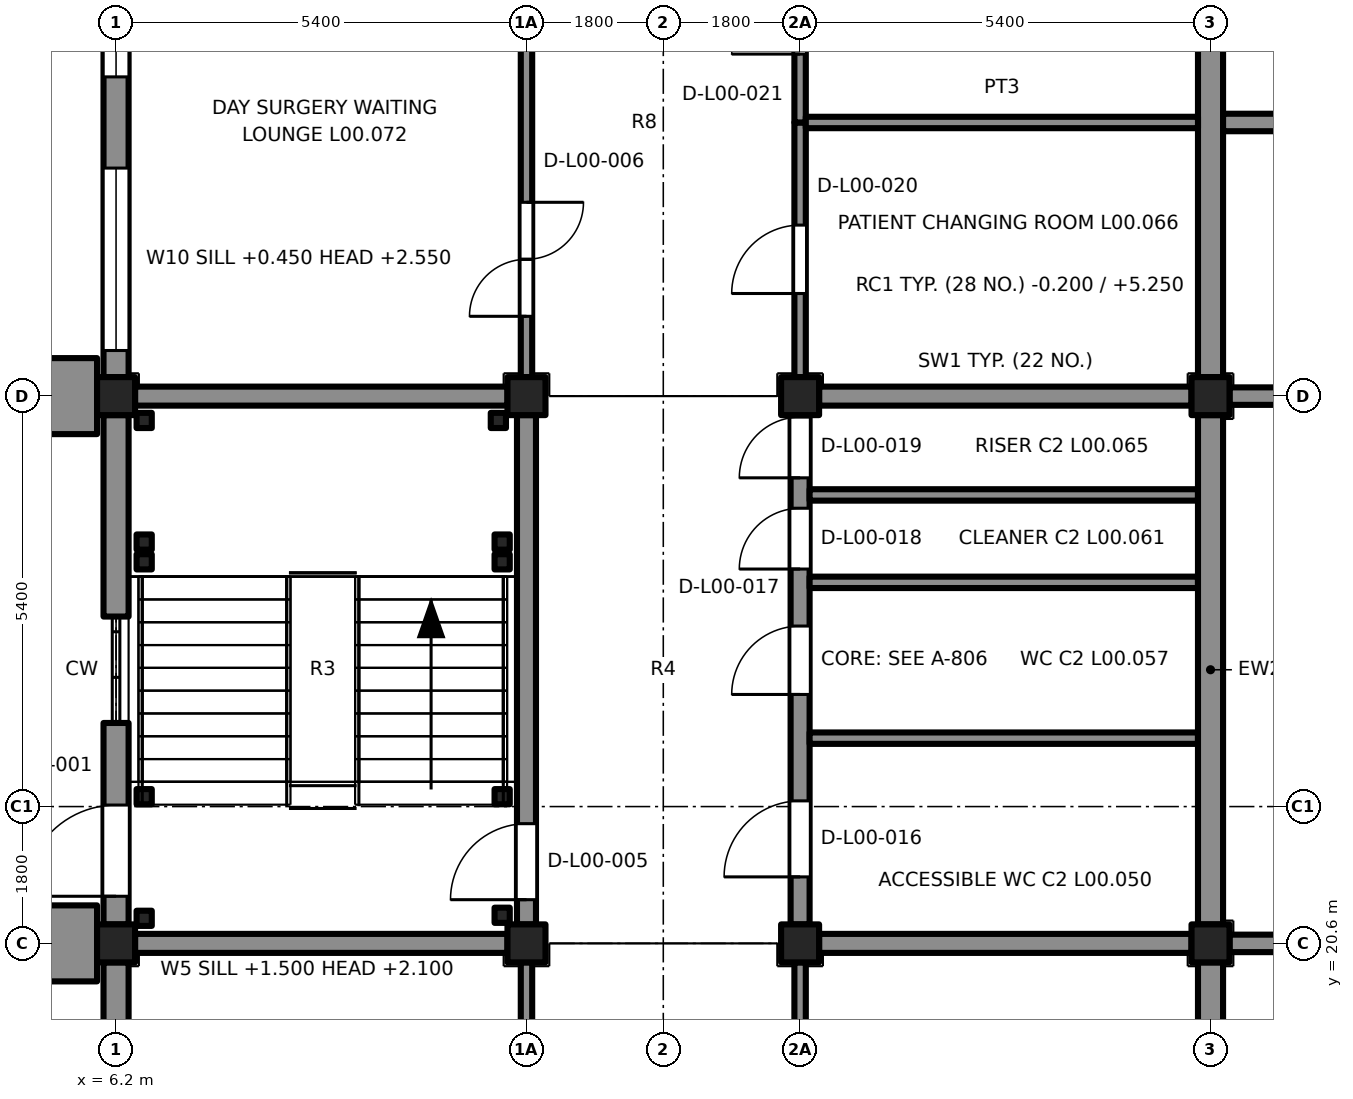
"""IFC4 building model, lengths in metres.
Left out: names, types, materials, properties, quantities, classifications, styles, units other than length and angle.
Written with IfcOpenShell. Run it as: python <this file> out.ifc"""

import sys

from ifc_helpers import new_model, si_unit, direction, frame, frame_2d, origin, origin_2d, place, context, subcontext, project, spatial, rectangle, extrude, element, fill, save


model = new_model("IFC4")
c1 = context("Model", 3, precision=1e-05, world=origin(), true_north=direction((0.0, 1.0)))
c2 = subcontext(c1, "Body", "Model", "MODEL_VIEW")
j1 = project(units=[si_unit("LENGTHUNIT", "METRE"), si_unit("PLANEANGLEUNIT", "RADIAN")], contexts=[c1])
p1 = place(None, origin())
s1 = spatial("IfcSite", under=j1, at=p1, CompositionType="ELEMENT")
p2 = place(p1, origin())
s2 = spatial("IfcBuilding", under=s1, at=p2, CompositionType="ELEMENT")
p3 = place(p2, origin())
s3 = spatial("IfcBuildingStorey", under=s2, at=p3, CompositionType="ELEMENT", Elevation=0.0)
for number, where, z_axis, x_axis in (
    (1, (6.2, 20.6, -0.2), (0.0, 0.0, 1.0), (1.0, 0.0, 0.0)),
    (2, (6.2, 27.8, -0.2), (0.0, 0.0, 1.0), (1.0, 0.0, 0.0)),
    (3, (11.6, 20.6, -0.2), (0.0, 0.0, 1.0), (1.0, 0.0, 0.0)),
    (4, (11.6, 27.8, -0.2), (0.0, 0.0, 1.0), (1.0, 0.0, 0.0)),
    (5, (15.2, 20.6, -0.2), (0.0, 0.0, 1.0), (1.0, 0.0, 0.0)),
    (6, (15.2, 27.8, -0.2), (0.0, 0.0, 1.0), (1.0, 0.0, 0.0)),
    (7, (20.6, 20.6, -0.2), (0.0, 0.0, 1.0), (1.0, 0.0, 0.0)),
    (8, (20.6, 27.8, -0.2), (0.0, 0.0, 1.0), (1.0, 0.0, 0.0)),
):
    element("IfcColumn", number, at=place(p3, frame(where, z_axis=z_axis, x_axis=x_axis)), inside=s3, PredefinedType="COLUMN", context=c2, shape_type="SweptSolid", body=[
        extrude(rectangle(XDim=0.5, YDim=0.5, at=origin_2d()), origin(), (0.0, 0.0, 1.0), 5.45),
    ])
p4 = place(p3, frame((11.6, 20.85, 0.0), z_axis=(0.0, 0.0, 1.0), x_axis=(0.0, 1.0, 0.0)))
e9 = element("IfcWall", 9, at=p4, inside=s3, PredefinedType="SHEAR", context=c2, shape_type="SweptSolid", body=[
    extrude(rectangle(XDim=6.7, YDim=0.25, at=frame_2d((3.35, 0.0))), origin(), (0.0, 0.0, 1.0), 6.05),
])
p5 = place(p4, frame((0.325, 0.0, 0.0)))
e10 = element("IfcOpeningElement", 10, at=p5, cuts=e9, PredefinedType="OPENING", context=c2, shape_type="SweptSolid", body=[
    extrude(rectangle(XDim=1.0, YDim=2.1, at=frame_2d((0.5, 1.05))), frame((0.0, 0.135, 0.0), z_axis=(0.0, -1.0, 0.0), x_axis=(1.0, 0.0, 0.0)), (0.0, 0.0, 1.0), 0.27),
])
for number, where, z_axis, x_axis in (
    (11, (6.45, 20.6, 0.0), (0.0, 0.0, 1.0), (1.0, 0.0, 0.0)),
    (12, (6.45, 27.8, 0.0), (0.0, 0.0, 1.0), (1.0, 0.0, 0.0)),
):
    element("IfcWall", number, at=place(p3, frame(where, z_axis=z_axis, x_axis=x_axis)), inside=s3, PredefinedType="SHEAR", context=c2, shape_type="SweptSolid", body=[
        extrude(rectangle(XDim=4.9, YDim=0.25, at=frame_2d((2.45, 0.0))), origin(), (0.0, 0.0, 1.0), 6.05),
    ])
p6 = place(p3, frame((15.2, 20.85, 0.0), z_axis=(0.0, 0.0, 1.0), x_axis=(0.0, 1.0, 0.0)))
e13 = element("IfcWall", 13, at=p6, inside=s3, PredefinedType="SHEAR", context=c2, shape_type="SweptSolid", body=[
    extrude(rectangle(XDim=6.7, YDim=0.25, at=frame_2d((3.35, 0.0))), origin(), (0.0, 0.0, 1.0), 6.05),
])
p7 = place(p6, frame((0.625, 0.0, 0.0)))
e14 = element("IfcOpeningElement", 14, at=p7, cuts=e13, PredefinedType="OPENING", context=c2, shape_type="SweptSolid", body=[
    extrude(rectangle(XDim=1.0, YDim=2.1, at=frame_2d((0.5, 1.05))), frame((0.0, 0.135, 0.0), z_axis=(0.0, -1.0, 0.0), x_axis=(1.0, 0.0, 0.0)), (0.0, 0.0, 1.0), 0.27),
])
p8 = place(p6, frame((3.025, 0.0, 0.0)))
e15 = element("IfcOpeningElement", 15, at=p8, cuts=e13, PredefinedType="OPENING", context=c2, shape_type="SweptSolid", body=[
    extrude(rectangle(XDim=0.9, YDim=2.1, at=frame_2d((0.45, 1.05))), frame((0.0, 0.135, 0.0), z_axis=(0.0, -1.0, 0.0), x_axis=(1.0, 0.0, 0.0)), (0.0, 0.0, 1.0), 0.27),
])
p9 = place(p6, frame((4.675, 0.0, 0.0)))
e16 = element("IfcOpeningElement", 16, at=p9, cuts=e13, PredefinedType="OPENING", context=c2, shape_type="SweptSolid", body=[
    extrude(rectangle(XDim=0.8, YDim=2.1, at=frame_2d((0.4, 1.05))), frame((0.0, 0.135, 0.0), z_axis=(0.0, -1.0, 0.0), x_axis=(1.0, 0.0, 0.0)), (0.0, 0.0, 1.0), 0.27),
])
p10 = place(p6, frame((5.875, 0.0, 0.0)))
e17 = element("IfcOpeningElement", 17, at=p10, cuts=e13, PredefinedType="OPENING", context=c2, shape_type="SweptSolid", body=[
    extrude(rectangle(XDim=0.8, YDim=2.1, at=frame_2d((0.4, 1.05))), frame((0.0, 0.135, 0.0), z_axis=(0.0, -1.0, 0.0), x_axis=(1.0, 0.0, 0.0)), (0.0, 0.0, 1.0), 0.27),
])
for number, where, z_axis, x_axis in (
    (18, (15.45, 20.6, 0.0), (0.0, 0.0, 1.0), (1.0, 0.0, 0.0)),
    (19, (15.45, 27.8, 0.0), (0.0, 0.0, 1.0), (1.0, 0.0, 0.0)),
):
    element("IfcWall", number, at=place(p3, frame(where, z_axis=z_axis, x_axis=x_axis)), inside=s3, PredefinedType="SHEAR", context=c2, shape_type="SweptSolid", body=[
        extrude(rectangle(XDim=4.9, YDim=0.25, at=frame_2d((2.45, 0.0))), origin(), (0.0, 0.0, 1.0), 6.05),
    ])
for number, where, z_axis, x_axis in (
    (20, (15.325, 23.3, 0.0), (0.0, 0.0, 1.0), (1.0, 0.0, 0.0)),
    (21, (15.325, 25.35, 0.0), (0.0, 0.0, 1.0), (1.0, 0.0, 0.0)),
    (22, (15.325, 26.5, 0.0), (0.0, 0.0, 1.0), (1.0, 0.0, 0.0)),
):
    element("IfcWall", number, at=place(p3, frame(where, z_axis=z_axis, x_axis=x_axis)), inside=s3, PredefinedType="PARTITIONING", context=c2, shape_type="SweptSolid", body=[
        extrude(rectangle(XDim=5.11, YDim=0.15, at=frame_2d((2.555, 0.0))), origin(), (0.0, 0.0, 1.0), 6.05),
    ])
p11 = place(p3, frame((6.57, 25.62, 0.0), z_axis=(0.0, 0.0, 1.0), x_axis=(1.0, 0.0, 0.0)))
e23 = element("IfcColumn", 23, at=p11, inside=s3, PredefinedType="COLUMN", context=c2, shape_type="SweptSolid", body=[
    extrude(rectangle(XDim=0.2, YDim=0.2, at=origin_2d()), origin(), (0.0, 0.0, 1.0), 4.45),
])
p12 = place(p3, frame((6.57, 27.48, 0.0), z_axis=(0.0, 0.0, 1.0), x_axis=(1.0, 0.0, 0.0)))
e24 = element("IfcColumn", 24, at=p12, inside=s3, PredefinedType="COLUMN", context=c2, shape_type="SweptSolid", body=[
    extrude(rectangle(XDim=0.2, YDim=0.2, at=origin_2d()), origin(), (0.0, 0.0, 1.0), 6.3),
])
p13 = place(p3, frame((11.28, 25.62, 0.0), z_axis=(0.0, 0.0, 1.0), x_axis=(1.0, 0.0, 0.0)))
e25 = element("IfcColumn", 25, at=p13, inside=s3, PredefinedType="COLUMN", context=c2, shape_type="SweptSolid", body=[
    extrude(rectangle(XDim=0.2, YDim=0.2, at=origin_2d()), origin(), (0.0, 0.0, 1.0), 4.45),
])
p14 = place(p3, frame((11.23, 27.48, 0.0), z_axis=(0.0, 0.0, 1.0), x_axis=(1.0, 0.0, 0.0)))
e26 = element("IfcColumn", 26, at=p14, inside=s3, PredefinedType="COLUMN", context=c2, shape_type="SweptSolid", body=[
    extrude(rectangle(XDim=0.2, YDim=0.2, at=origin_2d()), origin(), (0.0, 0.0, 1.0), 6.3),
])
for number, where, z_axis, x_axis in (
    (27, (6.57, 20.93, 0.0), (0.0, 0.0, 1.0), (1.0, 0.0, 0.0)),
    (28, (6.57, 22.53, 0.0), (0.0, 0.0, 1.0), (1.0, 0.0, 0.0)),
    (29, (11.28, 20.97, 0.0), (0.0, 0.0, 1.0), (1.0, 0.0, 0.0)),
    (30, (11.28, 22.53, 0.0), (0.0, 0.0, 1.0), (1.0, 0.0, 0.0)),
):
    element("IfcColumn", number, at=place(p3, frame(where, z_axis=z_axis, x_axis=x_axis)), inside=s3, PredefinedType="COLUMN", context=c2, shape_type="SweptSolid", body=[
        extrude(rectangle(XDim=0.2, YDim=0.2, at=origin_2d()), origin(), (0.0, 0.0, 1.0), 2.95),
    ])
for number, where, z_axis, x_axis in (
    (31, (6.57, 25.88, 0.0), (0.0, 0.0, 1.0), (1.0, 0.0, 0.0)),
    (32, (11.28, 25.88, 0.0), (0.0, 0.0, 1.0), (1.0, 0.0, 0.0)),
):
    element("IfcColumn", number, at=place(p3, frame(where, z_axis=z_axis, x_axis=x_axis)), inside=s3, PredefinedType="COLUMN", context=c2, shape_type="SweptSolid", body=[
        extrude(rectangle(XDim=0.2, YDim=0.2, at=origin_2d()), origin(), (0.0, 0.0, 1.0), 6.3),
    ])
p15 = place(p3, frame((6.2, 13.65, 0.0), z_axis=(0.0, 0.0, 1.0), x_axis=(0.0, 1.0, 0.0)))
e33 = element("IfcWall", 33, at=p15, inside=s3, PredefinedType="SOLIDWALL", context=c2, shape_type="SweptSolid", body=[
    extrude(rectangle(XDim=6.7, YDim=0.33, at=frame_2d((3.35, 0.0))), origin(), (0.0, 0.0, 1.0), 5.25),
])
p16 = place(p15, frame((0.95, 0.0, 0.9)))
e34 = element("IfcOpeningElement", 34, at=p16, cuts=e33, PredefinedType="OPENING", context=c2, shape_type="SweptSolid", body=[
    extrude(rectangle(XDim=1.2, YDim=1.5, at=frame_2d((0.6, 0.75))), frame((0.0, 0.175, 0.0), z_axis=(0.0, -1.0, 0.0), x_axis=(1.0, 0.0, 0.0)), (0.0, 0.0, 1.0), 0.35),
])
p17 = place(p15, frame((4.85, 0.0, 1.5)))
e35 = element("IfcOpeningElement", 35, at=p17, cuts=e33, PredefinedType="OPENING", context=c2, shape_type="SweptSolid", body=[
    extrude(rectangle(XDim=0.6, YDim=0.6, at=frame_2d((0.3, 0.3))), frame((0.0, 0.175, 0.0), z_axis=(0.0, -1.0, 0.0), x_axis=(1.0, 0.0, 0.0)), (0.0, 0.0, 1.0), 0.35),
])
p18 = place(p3, frame((6.2, 20.85, 0.0), z_axis=(0.0, 0.0, 1.0), x_axis=(0.0, 1.0, 0.0)))
e36 = element("IfcWall", 36, at=p18, inside=s3, PredefinedType="SOLIDWALL", context=c2, shape_type="SweptSolid", body=[
    extrude(rectangle(XDim=2.65, YDim=0.33, at=frame_2d((1.325, 0.0))), origin(), (0.0, 0.0, 1.0), 5.25),
])
p19 = place(p18, frame((0.37, 0.0, 0.0)))
e37 = element("IfcOpeningElement", 37, at=p19, cuts=e36, PredefinedType="OPENING", context=c2, shape_type="SweptSolid", body=[
    extrude(rectangle(XDim=1.2, YDim=2.1, at=frame_2d((0.6, 1.05))), frame((0.0, 0.175, 0.0), z_axis=(0.0, -1.0, 0.0), x_axis=(1.0, 0.0, 0.0)), (0.0, 0.0, 1.0), 0.35),
])
p20 = place(p3, frame((6.2, 24.9, 0.0), z_axis=(0.0, 0.0, 1.0), x_axis=(0.0, 1.0, 0.0)))
e38 = element("IfcWall", 38, at=p20, inside=s3, PredefinedType="SOLIDWALL", context=c2, shape_type="SweptSolid", body=[
    extrude(rectangle(XDim=2.65, YDim=0.33, at=frame_2d((1.325, 0.0))), origin(), (0.0, 0.0, 1.0), 5.25),
])
p21 = place(p3, frame((6.2, 28.05, 0.0), z_axis=(0.0, 0.0, 1.0), x_axis=(0.0, 1.0, 0.0)))
e39 = element("IfcWall", 39, at=p21, inside=s3, PredefinedType="SOLIDWALL", context=c2, shape_type="SweptSolid", body=[
    extrude(rectangle(XDim=6.7, YDim=0.33, at=frame_2d((3.35, 0.0))), origin(), (0.0, 0.0, 1.0), 5.25),
])
p22 = place(p21, frame((0.35, 0.0, 0.45)))
e40 = element("IfcOpeningElement", 40, at=p22, cuts=e39, PredefinedType="OPENING", context=c2, shape_type="SweptSolid", body=[
    extrude(rectangle(XDim=2.4, YDim=2.1, at=frame_2d((1.2, 1.05))), frame((0.0, 0.175, 0.0), z_axis=(0.0, -1.0, 0.0), x_axis=(1.0, 0.0, 0.0)), (0.0, 0.0, 1.0), 0.35),
])
p23 = place(p21, frame((3.95, 0.0, 0.45)))
e41 = element("IfcOpeningElement", 41, at=p23, cuts=e39, PredefinedType="OPENING", context=c2, shape_type="SweptSolid", body=[
    extrude(rectangle(XDim=2.4, YDim=2.1, at=frame_2d((1.2, 1.05))), frame((0.0, 0.175, 0.0), z_axis=(0.0, -1.0, 0.0), x_axis=(1.0, 0.0, 0.0)), (0.0, 0.0, 1.0), 0.35),
])
for number, where, z_axis, x_axis in (
    (42, (5.575, 20.1, 0.0), (0.0, 0.0, 1.0), (0.0, 1.0, 0.0)),
    (43, (5.575, 27.3, 0.0), (0.0, 0.0, 1.0), (0.0, 1.0, 0.0)),
):
    element("IfcWall", number, at=place(p3, frame(where, z_axis=z_axis, x_axis=x_axis)), inside=s3, PredefinedType="SOLIDWALL", context=c2, shape_type="SweptSolid", body=[
        extrude(rectangle(XDim=1.0, YDim=0.75, at=frame_2d((0.5, 0.0))), origin(), (0.0, 0.0, 1.0), 6.3),
    ])
p24 = place(p3, frame((20.6, 20.35, 0.0), z_axis=(0.0, 0.0, 1.0), x_axis=(0.0, -1.0, 0.0)))
e44 = element("IfcWall", 44, at=p24, inside=s3, PredefinedType="SOLIDWALL", context=c2, shape_type="SweptSolid", body=[
    extrude(rectangle(XDim=6.7, YDim=0.33, at=frame_2d((3.35, 0.0))), origin(), (0.0, 0.0, 1.0), 5.25),
])
for number, where, z_axis, x_axis in (
    (45, (20.6, 27.55, 0.0), (0.0, 0.0, 1.0), (0.0, -1.0, 0.0)),
    (46, (20.6, 34.75, 0.0), (0.0, 0.0, 1.0), (0.0, -1.0, 0.0)),
):
    element("IfcWall", number, at=place(p3, frame(where, z_axis=z_axis, x_axis=x_axis)), inside=s3, PredefinedType="SOLIDWALL", context=c2, shape_type="SweptSolid", body=[
        extrude(rectangle(XDim=6.7, YDim=0.33, at=frame_2d((3.35, 0.0))), origin(), (0.0, 0.0, 1.0), 5.25),
    ])
p25 = place(p3, frame((11.6, 20.35, 0.0), z_axis=(0.0, 0.0, 1.0), x_axis=(0.0, -1.0, 0.0)))
e47 = element("IfcWall", 47, at=p25, inside=s3, PredefinedType="PARTITIONING", context=c2, shape_type="SweptSolid", body=[
    extrude(rectangle(XDim=3.35, YDim=0.15, at=frame_2d((1.675, 0.0))), origin(), (0.0, 0.0, 1.0), 5.25),
])
p26 = place(p25, frame((1.1, 0.0, 0.0)))
e48 = element("IfcOpeningElement", 48, at=p26, cuts=e47, PredefinedType="OPENING", context=c2, shape_type="SweptSolid", body=[
    extrude(rectangle(XDim=0.9, YDim=2.1, at=frame_2d((0.45, 1.05))), frame((0.0, 0.085, 0.0), z_axis=(0.0, -1.0, 0.0), x_axis=(1.0, 0.0, 0.0)), (0.0, 0.0, 1.0), 0.17),
])
p27 = place(p3, frame((11.6, 28.05, 0.0), z_axis=(0.0, 0.0, 1.0), x_axis=(0.0, 1.0, 0.0)))
e49 = element("IfcWall", 49, at=p27, inside=s3, PredefinedType="PARTITIONING", context=c2, shape_type="SweptSolid", body=[
    extrude(rectangle(XDim=6.7, YDim=0.15, at=frame_2d((3.35, 0.0))), origin(), (0.0, 0.0, 1.0), 5.25),
])
p28 = place(p27, frame((0.8, 0.0, 0.0)))
e50 = element("IfcOpeningElement", 50, at=p28, cuts=e49, PredefinedType="OPENING", context=c2, shape_type="SweptSolid", body=[
    extrude(rectangle(XDim=1.5, YDim=2.1, at=frame_2d((0.75, 1.05))), frame((0.0, 0.085, 0.0), z_axis=(0.0, -1.0, 0.0), x_axis=(1.0, 0.0, 0.0)), (0.0, 0.0, 1.0), 0.17),
])
p29 = place(p3, frame((15.2, 20.35, 0.0), z_axis=(0.0, 0.0, 1.0), x_axis=(0.0, -1.0, 0.0)))
e51 = element("IfcWall", 51, at=p29, inside=s3, PredefinedType="PARTITIONING", context=c2, shape_type="SweptSolid", body=[
    extrude(rectangle(XDim=3.35, YDim=0.15, at=frame_2d((1.675, 0.0))), origin(), (0.0, 0.0, 1.0), 5.25),
])
p30 = place(p29, frame((1.05, 0.0, 0.0)))
e52 = element("IfcOpeningElement", 52, at=p30, cuts=e51, PredefinedType="OPENING", context=c2, shape_type="SweptSolid", body=[
    extrude(rectangle(XDim=1.0, YDim=2.1, at=frame_2d((0.5, 1.05))), frame((0.0, 0.085, 0.0), z_axis=(0.0, -1.0, 0.0), x_axis=(1.0, 0.0, 0.0)), (0.0, 0.0, 1.0), 0.17),
])
p31 = place(p3, frame((15.2, 28.05, 0.0), z_axis=(0.0, 0.0, 1.0), x_axis=(0.0, 1.0, 0.0)))
e53 = element("IfcWall", 53, at=p31, inside=s3, PredefinedType="PARTITIONING", context=c2, shape_type="SweptSolid", body=[
    extrude(rectangle(XDim=3.35, YDim=0.15, at=frame_2d((1.675, 0.0))), origin(), (0.0, 0.0, 1.0), 5.25),
])
p32 = place(p31, frame((1.1, 0.0, 0.0)))
e54 = element("IfcOpeningElement", 54, at=p32, cuts=e53, PredefinedType="OPENING", context=c2, shape_type="SweptSolid", body=[
    extrude(rectangle(XDim=0.9, YDim=2.1, at=frame_2d((0.45, 1.05))), frame((0.0, 0.085, 0.0), z_axis=(0.0, -1.0, 0.0), x_axis=(1.0, 0.0, 0.0)), (0.0, 0.0, 1.0), 0.17),
])
p33 = place(p3, frame((15.2, 34.75, 0.0), z_axis=(0.0, 0.0, 1.0), x_axis=(0.0, -1.0, 0.0)))
e55 = element("IfcWall", 55, at=p33, inside=s3, PredefinedType="PARTITIONING", context=c2, shape_type="SweptSolid", body=[
    extrude(rectangle(XDim=3.35, YDim=0.15, at=frame_2d((1.675, 0.0))), origin(), (0.0, 0.0, 1.0), 5.25),
])
p34 = place(p33, frame((0.65, 0.0, 0.0)))
e56 = element("IfcOpeningElement", 56, at=p34, cuts=e55, PredefinedType="OPENING", context=c2, shape_type="SweptSolid", body=[
    extrude(rectangle(XDim=1.8, YDim=2.1, at=frame_2d((0.9, 1.05))), frame((0.0, 0.085, 0.0), z_axis=(0.0, -1.0, 0.0), x_axis=(1.0, 0.0, 0.0)), (0.0, 0.0, 1.0), 0.17),
])
p35 = place(p3, frame((20.435, 31.4, 0.0), z_axis=(0.0, 0.0, 1.0), x_axis=(-1.0, 0.0, 0.0)))
e57 = element("IfcWall", 57, at=p35, inside=s3, PredefinedType="PARTITIONING", context=c2, shape_type="SweptSolid", body=[
    extrude(rectangle(XDim=5.16, YDim=0.15, at=frame_2d((2.58, 0.0))), origin(), (0.0, 0.0, 1.0), 6.05),
])
for number, where, z_axis, x_axis in (
    (58, (20.85, 20.6, 0.0), (0.0, 0.0, 1.0), (1.0, 0.0, 0.0)),
    (59, (20.85, 27.8, 0.0), (0.0, 0.0, 1.0), (1.0, 0.0, 0.0)),
):
    element("IfcWall", number, at=place(p3, frame(where, z_axis=z_axis, x_axis=x_axis)), inside=s3, PredefinedType="SOLIDWALL", context=c2, shape_type="SweptSolid", body=[
        extrude(rectangle(XDim=4.9, YDim=0.23, at=frame_2d((2.45, 0.0))), origin(), (0.0, 0.0, 1.0), 6.05),
    ])
p36 = place(p3, frame((20.765, 31.4, 0.0), z_axis=(0.0, 0.0, 1.0), x_axis=(1.0, 0.0, 0.0)))
e60 = element("IfcWall", 60, at=p36, inside=s3, PredefinedType="SOLIDWALL", context=c2, shape_type="SweptSolid", body=[
    extrude(rectangle(XDim=5.06, YDim=0.23, at=frame_2d((2.53, 0.0))), origin(), (0.0, 0.0, 1.0), 6.05),
])
p37 = place(p5, origin())
e61 = element("IfcDoor", 61, at=p37, inside=s3, OperationType="SINGLE_SWING_RIGHT", PredefinedType="DOOR", context=c2, shape_type="SweptSolid", body=[
    extrude(rectangle(XDim=1.0, YDim=2.1, at=frame_2d((0.5, 1.05))), frame((0.0, 0.025, 0.0), z_axis=(0.0, -1.0, 0.0), x_axis=(1.0, 0.0, 0.0)), (0.0, 0.0, 1.0), 0.05),
])
fill(e10, e61)
p38 = place(p7, origin())
e62 = element("IfcDoor", 62, at=p38, inside=s3, OperationType="SINGLE_SWING_LEFT", PredefinedType="DOOR", context=c2, shape_type="SweptSolid", body=[
    extrude(rectangle(XDim=1.0, YDim=2.1, at=frame_2d((0.5, 1.05))), frame((0.0, 0.025, 0.0), z_axis=(0.0, -1.0, 0.0), x_axis=(1.0, 0.0, 0.0)), (0.0, 0.0, 1.0), 0.05),
])
fill(e14, e62)
p39 = place(p8, origin())
e63 = element("IfcDoor", 63, at=p39, inside=s3, OperationType="SINGLE_SWING_LEFT", PredefinedType="DOOR", context=c2, shape_type="SweptSolid", body=[
    extrude(rectangle(XDim=0.9, YDim=2.1, at=frame_2d((0.45, 1.05))), frame((0.0, 0.025, 0.0), z_axis=(0.0, -1.0, 0.0), x_axis=(1.0, 0.0, 0.0)), (0.0, 0.0, 1.0), 0.05),
])
fill(e15, e63)
p40 = place(p9, origin())
e64 = element("IfcDoor", 64, at=p40, inside=s3, OperationType="SINGLE_SWING_LEFT", PredefinedType="DOOR", context=c2, shape_type="SweptSolid", body=[
    extrude(rectangle(XDim=0.8, YDim=2.1, at=frame_2d((0.4, 1.05))), frame((0.0, 0.025, 0.0), z_axis=(0.0, -1.0, 0.0), x_axis=(1.0, 0.0, 0.0)), (0.0, 0.0, 1.0), 0.05),
])
fill(e16, e64)
p41 = place(p10, origin())
e65 = element("IfcDoor", 65, at=p41, inside=s3, OperationType="SINGLE_SWING_LEFT", PredefinedType="DOOR", context=c2, shape_type="SweptSolid", body=[
    extrude(rectangle(XDim=0.8, YDim=2.1, at=frame_2d((0.4, 1.05))), frame((0.0, 0.025, 0.0), z_axis=(0.0, -1.0, 0.0), x_axis=(1.0, 0.0, 0.0)), (0.0, 0.0, 1.0), 0.05),
])
fill(e17, e65)
p42 = place(p19, origin())
e66 = element("IfcDoor", 66, at=p42, inside=s3, OperationType="SINGLE_SWING_LEFT", PredefinedType="DOOR", context=c2, shape_type="SweptSolid", body=[
    extrude(rectangle(XDim=1.2, YDim=2.1, at=frame_2d((0.6, 1.05))), frame((0.0, 0.025, 0.0), z_axis=(0.0, -1.0, 0.0), x_axis=(1.0, 0.0, 0.0)), (0.0, 0.0, 1.0), 0.05),
])
fill(e37, e66)
p43 = place(p22, origin())
e67 = element("IfcWindow", 67, at=p43, inside=s3, PartitioningType="SINGLE_PANEL", PredefinedType="WINDOW", context=c2, shape_type="SweptSolid", body=[
    extrude(rectangle(XDim=2.4, YDim=2.1, at=frame_2d((1.2, 1.05))), frame((0.0, -0.03, 0.0), z_axis=(0.0, -1.0, 0.0), x_axis=(1.0, 0.0, 0.0)), (0.0, 0.0, 1.0), 0.06),
])
fill(e40, e67)
p44 = place(p23, origin())
e68 = element("IfcWindow", 68, at=p44, inside=s3, PartitioningType="SINGLE_PANEL", PredefinedType="WINDOW", context=c2, shape_type="SweptSolid", body=[
    extrude(rectangle(XDim=2.4, YDim=2.1, at=frame_2d((1.2, 1.05))), frame((0.0, -0.03, 0.0), z_axis=(0.0, -1.0, 0.0), x_axis=(1.0, 0.0, 0.0)), (0.0, 0.0, 1.0), 0.06),
])
fill(e41, e68)
p45 = place(p28, origin())
e69 = element("IfcDoor", 69, at=p45, inside=s3, OperationType="DOUBLE_DOOR_SINGLE_SWING", PredefinedType="DOOR", context=c2, shape_type="SweptSolid", body=[
    extrude(rectangle(XDim=1.5, YDim=2.1, at=frame_2d((0.75, 1.05))), frame((0.0, 0.025, 0.0), z_axis=(0.0, -1.0, 0.0), x_axis=(1.0, 0.0, 0.0)), (0.0, 0.0, 1.0), 0.05),
])
fill(e50, e69)
p46 = place(p32, origin())
e70 = element("IfcDoor", 70, at=p46, inside=s3, OperationType="SINGLE_SWING_LEFT", PredefinedType="DOOR", context=c2, shape_type="SweptSolid", body=[
    extrude(rectangle(XDim=0.9, YDim=2.1, at=frame_2d((0.45, 1.05))), frame((0.0, 0.025, 0.0), z_axis=(0.0, -1.0, 0.0), x_axis=(1.0, 0.0, 0.0)), (0.0, 0.0, 1.0), 0.05),
])
fill(e54, e70)
p47 = place(p34, origin())
e71 = element("IfcDoor", 71, at=p47, inside=s3, OperationType="DOUBLE_DOOR_SINGLE_SWING", PredefinedType="DOOR", context=c2, shape_type="SweptSolid", body=[
    extrude(rectangle(XDim=1.8, YDim=2.1, at=frame_2d((0.9, 1.05))), frame((0.0, 0.025, 0.0), z_axis=(0.0, -1.0, 0.0), x_axis=(1.0, 0.0, 0.0)), (0.0, 0.0, 1.0), 0.05),
])
fill(e56, e71)
save(model, sys.argv[1])
